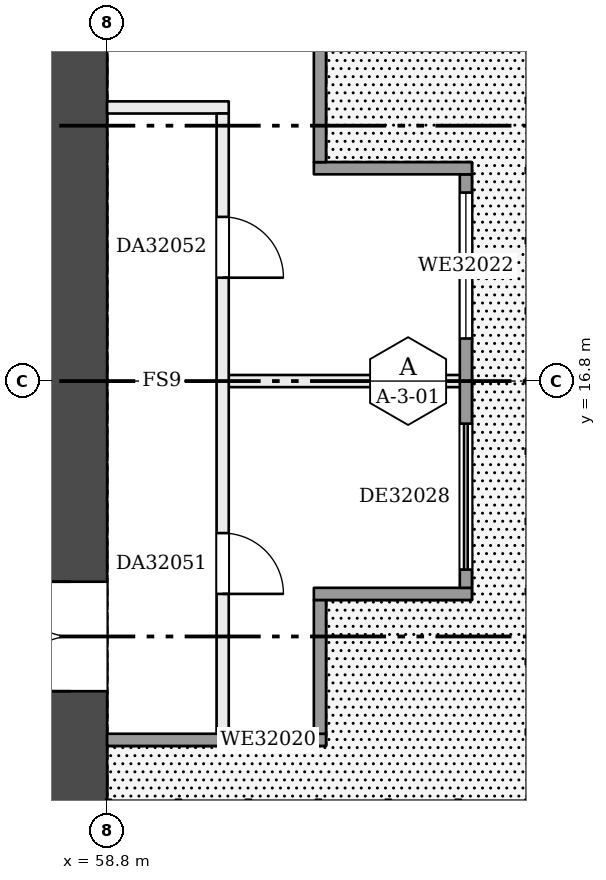
"""IFC4 building model, lengths in metres.
Left out: names, types, materials, properties, quantities, classifications, styles, units other than length and angle.
Written with IfcOpenShell. Run it as: python <this file> out.ifc"""

import sys

from ifc_helpers import new_model, si_unit, direction, frame, frame_2d, origin, place, context, subcontext, project, spatial, rectangle, extrude, element, fill, save


model = new_model("IFC4")
c1 = context("Model", 3, precision=1e-05, world=origin(), true_north=direction((0.0, 1.0)))
c2 = subcontext(c1, "Body", "Model", "MODEL_VIEW")
j1 = project(units=[si_unit("LENGTHUNIT", "METRE"), si_unit("PLANEANGLEUNIT", "RADIAN")], contexts=[c1])
p1 = place(None, origin())
s1 = spatial("IfcSite", under=j1, at=p1, CompositionType="ELEMENT")
p2 = place(p1, origin())
s2 = spatial("IfcBuilding", under=s1, at=p2, CompositionType="ELEMENT")
p3 = place(p2, frame((0.0, 0.0, 126.7)))
s3 = spatial("IfcBuildingStorey", under=s2, at=p3, CompositionType="ELEMENT", Elevation=126.7)
p4 = place(p3, frame((58.2, 9.6, 0.0), z_axis=(0.0, 0.0, 1.0), x_axis=(0.0, 1.0, 0.0)))
e1 = element("IfcWall", 1, at=p4, inside=s3, PredefinedType="SHEAR", context=c2, shape_type="SweptSolid", body=[
    extrude(rectangle(XDim=14.4, YDim=1.2, at=frame_2d((7.2, 0.0))), origin(), (0.0, 0.0, 1.0), 3.22),
])
p5 = place(p4, frame((2.1, 0.0, 0.0)))
e2 = element("IfcOpeningElement", 2, at=p5, cuts=e1, PredefinedType="OPENING", context=c2, shape_type="SweptSolid", body=[
    extrude(rectangle(XDim=1.8, YDim=2.1, at=frame_2d((0.9, 1.05))), frame((0.0, 0.61, 0.0), z_axis=(0.0, -1.0, 0.0), x_axis=(1.0, 0.0, 0.0)), (0.0, 0.0, 1.0), 1.22),
])
p6 = place(p3, frame((60.8, 16.8, 0.0), z_axis=(0.0, 0.0, 1.0), x_axis=(1.0, 0.0, 0.0)))
e3 = element("IfcWall", 3, at=p6, inside=s3, PredefinedType="PARTITIONING", context=c2, shape_type="SweptSolid", body=[
    extrude(rectangle(XDim=3.9, YDim=0.2, at=frame_2d((1.95, 0.0))), origin(), (0.0, 0.0, 1.0), 3.22),
])
p7 = place(p3, frame((58.8, 21.3, 0.0), z_axis=(0.0, 0.0, 1.0), x_axis=(1.0, 0.0, 0.0)))
e4 = element("IfcWall", 4, at=p7, inside=s3, PredefinedType="PARTITIONING", context=c2, shape_type="SweptSolid", body=[
    extrude(rectangle(XDim=2.0, YDim=0.2, at=frame_2d((1.0, 0.0))), origin(), (0.0, 0.0, 1.0), 3.22),
])
p8 = place(p3, frame((60.7, 10.9, 0.0), z_axis=(0.0, 0.0, 1.0), x_axis=(0.0, 1.0, 0.0)))
e5 = element("IfcWall", 5, at=p8, inside=s3, PredefinedType="PARTITIONING", context=c2, shape_type="SweptSolid", body=[
    extrude(rectangle(XDim=10.3, YDim=0.2, at=frame_2d((5.15, 0.0))), origin(), (0.0, 0.0, 1.0), 3.22),
])
p9 = place(p8, frame((2.4, 0.0, 0.0)))
e6 = element("IfcOpeningElement", 6, at=p9, cuts=e5, PredefinedType="OPENING", context=c2, shape_type="SweptSolid", body=[
    extrude(rectangle(XDim=1.0, YDim=2.1, at=frame_2d((0.5, 1.05))), frame((0.0, 0.11, 0.0), z_axis=(0.0, -1.0, 0.0), x_axis=(1.0, 0.0, 0.0)), (0.0, 0.0, 1.0), 0.22),
])
p10 = place(p8, frame((7.6, 0.0, 0.0)))
e7 = element("IfcOpeningElement", 7, at=p10, cuts=e5, PredefinedType="OPENING", context=c2, shape_type="SweptSolid", body=[
    extrude(rectangle(XDim=1.0, YDim=2.1, at=frame_2d((0.5, 1.05))), frame((0.0, 0.11, 0.0), z_axis=(0.0, -1.0, 0.0), x_axis=(1.0, 0.0, 0.0)), (0.0, 0.0, 1.0), 0.22),
])
p11 = place(p3, frame((58.8, 10.9, 0.0), z_axis=(0.0, 0.0, 1.0), x_axis=(1.0, 0.0, 0.0)))
e8 = element("IfcWall", 8, at=p11, inside=s3, PredefinedType="SOLIDWALL", context=c2, shape_type="SweptSolid", body=[
    extrude(rectangle(XDim=3.6, YDim=0.2, at=frame_2d((1.8, 0.0))), origin(), (0.0, 0.0, 1.0), 3.22),
])
p12 = place(p11, frame((2.0, 0.0, 0.9)))
e9 = element("IfcOpeningElement", 9, at=p12, cuts=e8, PredefinedType="OPENING", context=c2, shape_type="SweptSolid", body=[
    extrude(rectangle(XDim=1.3, YDim=1.5, at=frame_2d((0.65, 0.75))), frame((0.0, 0.11, 0.0), z_axis=(0.0, -1.0, 0.0), x_axis=(1.0, 0.0, 0.0)), (0.0, 0.0, 1.0), 0.22),
])
p13 = place(p3, frame((62.3, 11.0, 0.0), z_axis=(0.0, 0.0, 1.0), x_axis=(0.0, 1.0, 0.0)))
e10 = element("IfcWall", 10, at=p13, inside=s3, PredefinedType="SOLIDWALL", context=c2, shape_type="SweptSolid", body=[
    extrude(rectangle(XDim=2.2, YDim=0.2, at=frame_2d((1.1, 0.0))), origin(), (0.0, 0.0, 1.0), 3.22),
])
p14 = place(p3, frame((62.2, 13.3, 0.0), z_axis=(0.0, 0.0, 1.0), x_axis=(1.0, 0.0, 0.0)))
e11 = element("IfcWall", 11, at=p14, inside=s3, PredefinedType="SOLIDWALL", context=c2, shape_type="SweptSolid", body=[
    extrude(rectangle(XDim=2.6, YDim=0.2, at=frame_2d((1.3, 0.0))), origin(), (0.0, 0.0, 1.0), 3.22),
])
p15 = place(p3, frame((64.7, 13.4, 0.0), z_axis=(0.0, 0.0, 1.0), x_axis=(0.0, 1.0, 0.0)))
e12 = element("IfcWall", 12, at=p15, inside=s3, PredefinedType="SOLIDWALL", context=c2, shape_type="SweptSolid", body=[
    extrude(rectangle(XDim=6.8, YDim=0.2, at=frame_2d((3.4, 0.0))), origin(), (0.0, 0.0, 1.0), 3.22),
])
p16 = place(p15, frame((4.1, 0.0, 0.9)))
e13 = element("IfcOpeningElement", 13, at=p16, cuts=e12, PredefinedType="OPENING", context=c2, shape_type="SweptSolid", body=[
    extrude(rectangle(XDim=2.4, YDim=1.5, at=frame_2d((1.2, 0.75))), frame((0.0, 0.11, 0.0), z_axis=(0.0, -1.0, 0.0), x_axis=(1.0, 0.0, 0.0)), (0.0, 0.0, 1.0), 0.22),
])
p17 = place(p15, frame((0.3, 0.0, 0.0)))
e14 = element("IfcOpeningElement", 14, at=p17, cuts=e12, PredefinedType="OPENING", context=c2, shape_type="SweptSolid", body=[
    extrude(rectangle(XDim=2.4, YDim=2.2, at=frame_2d((1.2, 1.1))), frame((0.0, 0.11, 0.0), z_axis=(0.0, -1.0, 0.0), x_axis=(1.0, 0.0, 0.0)), (0.0, 0.0, 1.0), 0.22),
])
p18 = place(p3, frame((64.8, 20.3, 0.0), z_axis=(0.0, 0.0, 1.0), x_axis=(-1.0, 0.0, 0.0)))
e15 = element("IfcWall", 15, at=p18, inside=s3, PredefinedType="SOLIDWALL", context=c2, shape_type="SweptSolid", body=[
    extrude(rectangle(XDim=2.6, YDim=0.2, at=frame_2d((1.3, 0.0))), origin(), (0.0, 0.0, 1.0), 3.22),
])
p19 = place(p3, frame((62.3, 20.4, 0.0), z_axis=(0.0, 0.0, 1.0), x_axis=(0.0, 1.0, 0.0)))
e16 = element("IfcWall", 16, at=p19, inside=s3, PredefinedType="SOLIDWALL", context=c2, shape_type="SweptSolid", body=[
    extrude(rectangle(XDim=2.2, YDim=0.2, at=frame_2d((1.1, 0.0))), origin(), (0.0, 0.0, 1.0), 3.22),
])
p20 = place(p5, origin())
e17 = element("IfcDoor", 17, at=p20, inside=s3, OperationType="DOUBLE_DOOR_SINGLE_SWING", PredefinedType="DOOR", context=c2, shape_type="SweptSolid", body=[
    extrude(rectangle(XDim=1.8, YDim=2.1, at=frame_2d((0.9, 1.05))), frame((0.0, 0.025, 0.0), z_axis=(0.0, -1.0, 0.0), x_axis=(1.0, 0.0, 0.0)), (0.0, 0.0, 1.0), 0.05),
])
fill(e2, e17)
p21 = place(p9, frame((1.0, 0.0, 0.0), z_axis=(0.0, 0.0, 1.0), x_axis=(-1.0, 0.0, 0.0)))
e18 = element("IfcDoor", 18, at=p21, inside=s3, OperationType="SINGLE_SWING_RIGHT", PredefinedType="DOOR", context=c2, shape_type="SweptSolid", body=[
    extrude(rectangle(XDim=1.0, YDim=2.1, at=frame_2d((0.5, 1.05))), frame((0.0, 0.025, 0.0), z_axis=(0.0, -1.0, 0.0), x_axis=(1.0, 0.0, 0.0)), (0.0, 0.0, 1.0), 0.05),
])
fill(e6, e18)
p22 = place(p10, frame((1.0, 0.0, 0.0), z_axis=(0.0, 0.0, 1.0), x_axis=(-1.0, 0.0, 0.0)))
e19 = element("IfcDoor", 19, at=p22, inside=s3, OperationType="SINGLE_SWING_RIGHT", PredefinedType="DOOR", context=c2, shape_type="SweptSolid", body=[
    extrude(rectangle(XDim=1.0, YDim=2.1, at=frame_2d((0.5, 1.05))), frame((0.0, 0.025, 0.0), z_axis=(0.0, -1.0, 0.0), x_axis=(1.0, 0.0, 0.0)), (0.0, 0.0, 1.0), 0.05),
])
fill(e7, e19)
p23 = place(p12, origin())
e20 = element("IfcWindow", 20, at=p23, inside=s3, PartitioningType="SINGLE_PANEL", PredefinedType="WINDOW", context=c2, shape_type="SweptSolid", body=[
    extrude(rectangle(XDim=1.3, YDim=1.5, at=frame_2d((0.65, 0.75))), frame((0.0, 0.03, 0.0), z_axis=(0.0, -1.0, 0.0), x_axis=(1.0, 0.0, 0.0)), (0.0, 0.0, 1.0), 0.06),
])
fill(e9, e20)
p24 = place(p16, origin())
e21 = element("IfcWindow", 21, at=p24, inside=s3, PartitioningType="SINGLE_PANEL", PredefinedType="WINDOW", context=c2, shape_type="SweptSolid", body=[
    extrude(rectangle(XDim=2.4, YDim=1.5, at=frame_2d((1.2, 0.75))), frame((0.0, 0.03, 0.0), z_axis=(0.0, -1.0, 0.0), x_axis=(1.0, 0.0, 0.0)), (0.0, 0.0, 1.0), 0.06),
])
fill(e13, e21)
p25 = place(p17, origin())
e22 = element("IfcDoor", 22, at=p25, inside=s3, OperationType="DOUBLE_DOOR_SLIDING", PredefinedType="DOOR", context=c2, shape_type="SweptSolid", body=[
    extrude(rectangle(XDim=2.4, YDim=2.2, at=frame_2d((1.2, 1.1))), frame((0.0, 0.025, 0.0), z_axis=(0.0, -1.0, 0.0), x_axis=(1.0, 0.0, 0.0)), (0.0, 0.0, 1.0), 0.05),
])
fill(e14, e22)
save(model, sys.argv[1])
